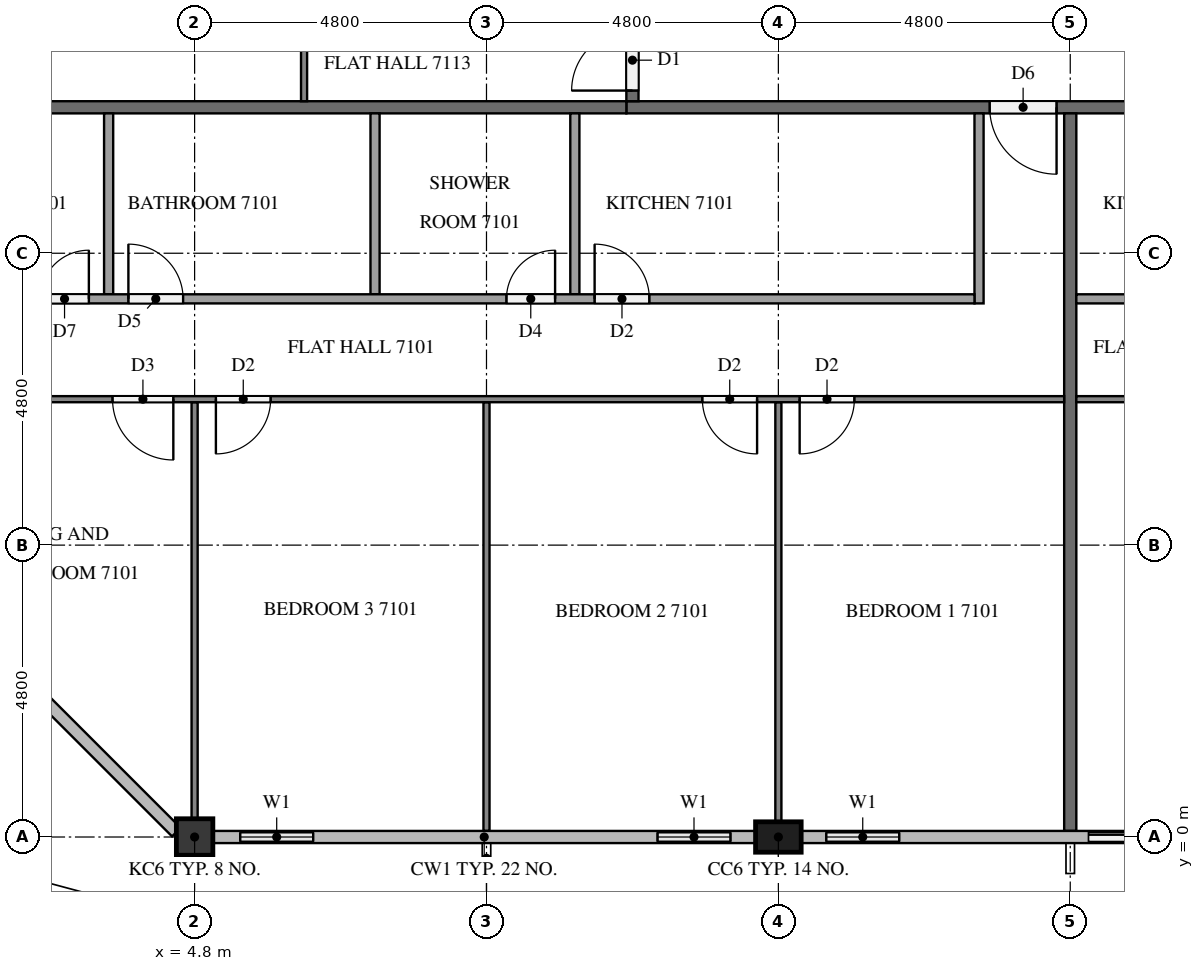
"""IFC4 building model, lengths in metres.
Left out: names, types, materials, properties, quantities, classifications, styles, units other than length and angle.
Written with IfcOpenShell. Run it as: python <this file> out.ifc"""

import sys

from ifc_helpers import new_model, si_unit, direction, frame, frame_2d, origin, origin_2d, place, context, subcontext, project, spatial, rectangle, extrude, element, fill, save


model = new_model("IFC4")
c1 = context("Model", 3, precision=1e-05, world=origin(), true_north=direction((0.0, 1.0)))
c2 = subcontext(c1, "Body", "Model", "MODEL_VIEW")
j1 = project(units=[si_unit("LENGTHUNIT", "METRE"), si_unit("PLANEANGLEUNIT", "RADIAN")], contexts=[c1])
p1 = place(None, origin())
s1 = spatial("IfcSite", under=j1, at=p1, CompositionType="ELEMENT")
p2 = place(p1, origin())
s2 = spatial("IfcBuilding", under=s1, at=p2, CompositionType="ELEMENT")
p3 = place(p2, frame((0.0, 0.0, 272.1)))
s3 = spatial("IfcBuildingStorey", under=s2, at=p3, CompositionType="ELEMENT", Elevation=272.1)
p4 = place(p3, frame((4.8, 0.0, 0.0), z_axis=(0.0, 0.0, 1.0), x_axis=(1.0, 0.0, 0.0)))
e1 = element("IfcColumn", 1, at=p4, inside=s3, PredefinedType="COLUMN", context=c2, shape_type="SweptSolid", body=[
    extrude(rectangle(XDim=0.6, YDim=0.6, at=origin_2d()), origin(), (0.0, 0.0, 1.0), 3.2),
])
p5 = place(p3, frame((14.4, 0.0, 0.0), z_axis=(0.0, 0.0, 1.0), x_axis=(1.0, 0.0, 0.0)))
e2 = element("IfcColumn", 2, at=p5, inside=s3, PredefinedType="COLUMN", context=c2, shape_type="SweptSolid", body=[
    extrude(rectangle(XDim=0.75, YDim=0.5, at=origin_2d()), origin(), (0.0, 0.0, 1.0), 3.2),
])
p6 = place(p3, frame((5.1, 0.0, 0.0), z_axis=(0.0, 0.0, 1.0), x_axis=(1.0, 0.0, 0.0)))
e3 = element("IfcWall", 3, at=p6, inside=s3, PredefinedType="SOLIDWALL", context=c2, shape_type="SweptSolid", body=[
    extrude(rectangle(XDim=2.1, YDim=0.15, at=frame_2d((1.05, 0.0))), origin(), (0.0, 0.0, 1.0), 3.2),
])
p7 = place(p6, frame((0.45, 0.0, 0.9)))
e4 = element("IfcOpeningElement", 4, at=p7, cuts=e3, PredefinedType="OPENING", context=c2, shape_type="SweptSolid", body=[
    extrude(rectangle(XDim=1.2, YDim=1.4, at=frame_2d((0.6, 0.7))), frame((0.0, 0.085, 0.0), z_axis=(0.0, -1.0, 0.0), x_axis=(1.0, 0.0, 0.0)), (0.0, 0.0, 1.0), 0.17),
])
p8 = place(p3, frame((12.0, 0.0, 0.0), z_axis=(0.0, 0.0, 1.0), x_axis=(1.0, 0.0, 0.0)))
e5 = element("IfcWall", 5, at=p8, inside=s3, PredefinedType="SOLIDWALL", context=c2, shape_type="SweptSolid", body=[
    extrude(rectangle(XDim=2.025, YDim=0.15, at=frame_2d((1.012, 0.0))), origin(), (0.0, 0.0, 1.0), 3.2),
])
p9 = place(p8, frame((0.413, 0.0, 0.9)))
e6 = element("IfcOpeningElement", 6, at=p9, cuts=e5, PredefinedType="OPENING", context=c2, shape_type="SweptSolid", body=[
    extrude(rectangle(XDim=1.2, YDim=1.4, at=frame_2d((0.6, 0.7))), frame((0.0, 0.085, 0.0), z_axis=(0.0, -1.0, 0.0), x_axis=(1.0, 0.0, 0.0)), (0.0, 0.0, 1.0), 0.17),
])
p10 = place(p3, frame((14.775, 0.0, 0.0), z_axis=(0.0, 0.0, 1.0), x_axis=(1.0, 0.0, 0.0)))
e7 = element("IfcWall", 7, at=p10, inside=s3, PredefinedType="SOLIDWALL", context=c2, shape_type="SweptSolid", body=[
    extrude(rectangle(XDim=2.025, YDim=0.15, at=frame_2d((1.013, 0.0))), origin(), (0.0, 0.0, 1.0), 3.2),
])
p11 = place(p10, frame((0.413, 0.0, 0.9)))
e8 = element("IfcOpeningElement", 8, at=p11, cuts=e7, PredefinedType="OPENING", context=c2, shape_type="SweptSolid", body=[
    extrude(rectangle(XDim=1.2, YDim=1.4, at=frame_2d((0.6, 0.7))), frame((0.0, 0.085, 0.0), z_axis=(0.0, -1.0, 0.0), x_axis=(1.0, 0.0, 0.0)), (0.0, 0.0, 1.0), 0.17),
])
p12 = place(p3, frame((19.2, 0.0, 0.0), z_axis=(0.0, 0.0, 1.0), x_axis=(1.0, 0.0, 0.0)))
e9 = element("IfcWall", 9, at=p12, inside=s3, PredefinedType="SOLIDWALL", context=c2, shape_type="SweptSolid", body=[
    extrude(rectangle(XDim=2.4, YDim=0.15, at=frame_2d((1.2, 0.0))), origin(), (0.0, 0.0, 1.0), 3.2),
])
p13 = place(p12, frame((0.3, 0.0, 0.0)))
e10 = element("IfcOpeningElement", 10, at=p13, cuts=e9, PredefinedType="OPENING", context=c2, shape_type="SweptSolid", body=[
    extrude(rectangle(XDim=1.8, YDim=2.4, at=frame_2d((0.9, 1.2))), frame((0.0, 0.085, 0.0), z_axis=(0.0, -1.0, 0.0), x_axis=(1.0, 0.0, 0.0)), (0.0, 0.0, 1.0), 0.17),
])
p14 = place(p3, frame((50.5, 12.0, 0.0), z_axis=(0.0, 0.0, 1.0), x_axis=(-1.0, 0.0, 0.0)))
e11 = element("IfcWall", 11, at=p14, inside=s3, PredefinedType="PARTITIONING", context=c2, shape_type="SweptSolid", body=[
    extrude(rectangle(XDim=38.6, YDim=0.2, at=frame_2d((19.3, 0.0))), origin(), (0.0, 0.0, 1.0), 3.2),
])
p15 = place(p14, frame((31.525, 0.0, 0.0)))
e12 = element("IfcOpeningElement", 12, at=p15, cuts=e11, PredefinedType="OPENING", context=c2, shape_type="SweptSolid", body=[
    extrude(rectangle(XDim=1.1, YDim=2.1, at=frame_2d((0.55, 1.05))), frame((0.0, 0.11, 0.0), z_axis=(0.0, -1.0, 0.0), x_axis=(1.0, 0.0, 0.0)), (0.0, 0.0, 1.0), 0.22),
])
p16 = place(p14, frame((19.575, 0.0, 0.0)))
e13 = element("IfcOpeningElement", 13, at=p16, cuts=e11, PredefinedType="OPENING", context=c2, shape_type="SweptSolid", body=[
    extrude(rectangle(XDim=1.0, YDim=2.1, at=frame_2d((0.5, 1.05))), frame((0.0, 0.11, 0.0), z_axis=(0.0, -1.0, 0.0), x_axis=(1.0, 0.0, 0.0)), (0.0, 0.0, 1.0), 0.22),
])
p17 = place(p14, frame((18.025, 0.0, 0.0)))
e14 = element("IfcOpeningElement", 14, at=p17, cuts=e11, PredefinedType="OPENING", context=c2, shape_type="SweptSolid", body=[
    extrude(rectangle(XDim=1.0, YDim=2.1, at=frame_2d((0.5, 1.05))), frame((0.0, 0.11, 0.0), z_axis=(0.0, -1.0, 0.0), x_axis=(1.0, 0.0, 0.0)), (0.0, 0.0, 1.0), 0.22),
])
p18 = place(p14, frame((1.225, 0.0, 0.0)))
e15 = element("IfcOpeningElement", 15, at=p18, cuts=e11, PredefinedType="OPENING", context=c2, shape_type="SweptSolid", body=[
    extrude(rectangle(XDim=1.0, YDim=2.1, at=frame_2d((0.5, 1.05))), frame((0.0, 0.11, 0.0), z_axis=(0.0, -1.0, 0.0), x_axis=(1.0, 0.0, 0.0)), (0.0, 0.0, 1.0), 0.22),
])
p19 = place(p3, frame((12.0, 12.1, 0.0), z_axis=(0.0, 0.0, 1.0), x_axis=(0.0, 1.0, 0.0)))
e16 = element("IfcWall", 16, at=p19, inside=s3, PredefinedType="PARTITIONING", context=c2, shape_type="SweptSolid", body=[
    extrude(rectangle(XDim=28.6, YDim=0.2, at=frame_2d((14.3, 0.0))), origin(), (0.0, 0.0, 1.0), 3.2),
])
p20 = place(p19, frame((24.175, 0.0, 0.0)))
e17 = element("IfcOpeningElement", 17, at=p20, cuts=e16, PredefinedType="OPENING", context=c2, shape_type="SweptSolid", body=[
    extrude(rectangle(XDim=1.0, YDim=2.1, at=frame_2d((0.5, 1.05))), frame((0.0, 0.11, 0.0), z_axis=(0.0, -1.0, 0.0), x_axis=(1.0, 0.0, 0.0)), (0.0, 0.0, 1.0), 0.22),
])
p21 = place(p19, frame((14.575, 0.0, 0.0)))
e18 = element("IfcOpeningElement", 18, at=p21, cuts=e16, PredefinedType="OPENING", context=c2, shape_type="SweptSolid", body=[
    extrude(rectangle(XDim=1.0, YDim=2.1, at=frame_2d((0.5, 1.05))), frame((0.0, 0.11, 0.0), z_axis=(0.0, -1.0, 0.0), x_axis=(1.0, 0.0, 0.0)), (0.0, 0.0, 1.0), 0.22),
])
p22 = place(p19, frame((0.175, 0.0, 0.0)))
e19 = element("IfcOpeningElement", 19, at=p22, cuts=e16, PredefinedType="OPENING", context=c2, shape_type="SweptSolid", body=[
    extrude(rectangle(XDim=1.0, YDim=2.1, at=frame_2d((0.5, 1.05))), frame((0.0, 0.11, 0.0), z_axis=(0.0, -1.0, 0.0), x_axis=(1.0, 0.0, 0.0)), (0.0, 0.0, 1.0), 0.22),
])
for number, where, z_axis, x_axis in (
    (20, (19.2, 11.9, 0.0), (0.0, 0.0, 1.0), (0.0, -1.0, 0.0)),
    (21, (0.1, 12.0, 0.0), (0.0, 0.0, 1.0), (1.0, 0.0, 0.0)),
):
    element("IfcWall", number, at=place(p3, frame(where, z_axis=z_axis, x_axis=x_axis)), inside=s3, PredefinedType="PARTITIONING", context=c2, shape_type="SweptSolid", body=[
        extrude(rectangle(XDim=11.8, YDim=0.2, at=frame_2d((5.9, 0.0))), origin(), (0.0, 0.0, 1.0), 3.2),
    ])
p23 = place(p3, frame((14.4, 7.15, 0.0), z_axis=(0.0, 0.0, 1.0), x_axis=(0.0, -1.0, 0.0)))
e22 = element("IfcWall", 22, at=p23, inside=s3, PredefinedType="PARTITIONING", context=c2, shape_type="SweptSolid", body=[
    extrude(rectangle(XDim=6.9, YDim=0.1, at=frame_2d((3.45, 0.0))), origin(), (0.0, 0.0, 1.0), 3.2),
])
p24 = place(p3, frame((9.6, 7.15, 0.0), z_axis=(0.0, 0.0, 1.0), x_axis=(0.0, -1.0, 0.0)))
e23 = element("IfcWall", 23, at=p24, inside=s3, PredefinedType="PARTITIONING", context=c2, shape_type="SweptSolid", body=[
    extrude(rectangle(XDim=7.05, YDim=0.1, at=frame_2d((3.525, 0.0))), origin(), (0.0, 0.0, 1.0), 3.2),
])
p25 = place(p3, frame((4.8, 7.15, 0.0), z_axis=(0.0, 0.0, 1.0), x_axis=(0.0, -1.0, 0.0)))
e24 = element("IfcWall", 24, at=p25, inside=s3, PredefinedType="PARTITIONING", context=c2, shape_type="SweptSolid", body=[
    extrude(rectangle(XDim=6.85, YDim=0.1, at=frame_2d((3.425, 0.0))), origin(), (0.0, 0.0, 1.0), 3.2),
])
p26 = place(p3, frame((19.1, 7.2, 0.0), z_axis=(0.0, 0.0, 1.0), x_axis=(-1.0, 0.0, 0.0)))
e25 = element("IfcWall", 25, at=p26, inside=s3, PredefinedType="PARTITIONING", context=c2, shape_type="SweptSolid", body=[
    extrude(rectangle(XDim=19.0, YDim=0.1, at=frame_2d((9.5, 0.0))), origin(), (0.0, 0.0, 1.0), 3.2),
])
p27 = place(p26, frame((3.45, 0.0, 0.0)))
e26 = element("IfcOpeningElement", 26, at=p27, cuts=e25, PredefinedType="OPENING", context=c2, shape_type="SweptSolid", body=[
    extrude(rectangle(XDim=0.9, YDim=2.1, at=frame_2d((0.45, 1.05))), frame((0.0, 0.06, 0.0), z_axis=(0.0, -1.0, 0.0), x_axis=(1.0, 0.0, 0.0)), (0.0, 0.0, 1.0), 0.12),
])
p28 = place(p26, frame((5.05, 0.0, 0.0)))
e27 = element("IfcOpeningElement", 27, at=p28, cuts=e25, PredefinedType="OPENING", context=c2, shape_type="SweptSolid", body=[
    extrude(rectangle(XDim=0.9, YDim=2.1, at=frame_2d((0.45, 1.05))), frame((0.0, 0.06, 0.0), z_axis=(0.0, -1.0, 0.0), x_axis=(1.0, 0.0, 0.0)), (0.0, 0.0, 1.0), 0.12),
])
p29 = place(p26, frame((13.05, 0.0, 0.0)))
e28 = element("IfcOpeningElement", 28, at=p29, cuts=e25, PredefinedType="OPENING", context=c2, shape_type="SweptSolid", body=[
    extrude(rectangle(XDim=0.9, YDim=2.1, at=frame_2d((0.45, 1.05))), frame((0.0, 0.06, 0.0), z_axis=(0.0, -1.0, 0.0), x_axis=(1.0, 0.0, 0.0)), (0.0, 0.0, 1.0), 0.12),
])
p30 = place(p26, frame((14.65, 0.0, 0.0)))
e29 = element("IfcOpeningElement", 29, at=p30, cuts=e25, PredefinedType="OPENING", context=c2, shape_type="SweptSolid", body=[
    extrude(rectangle(XDim=1.0, YDim=2.1, at=frame_2d((0.5, 1.05))), frame((0.0, 0.06, 0.0), z_axis=(0.0, -1.0, 0.0), x_axis=(1.0, 0.0, 0.0)), (0.0, 0.0, 1.0), 0.12),
])
for number, where, z_axis, x_axis in (
    (30, (11.053, 11.9, 0.0), (0.0, 0.0, 1.0), (0.0, -1.0, 0.0)),
    (31, (7.767, 11.9, 0.0), (0.0, 0.0, 1.0), (0.0, -1.0, 0.0)),
    (32, (3.386, 11.9, 0.0), (0.0, 0.0, 1.0), (0.0, -1.0, 0.0)),
):
    element("IfcWall", number, at=place(p3, frame(where, z_axis=z_axis, x_axis=x_axis)), inside=s3, PredefinedType="PARTITIONING", context=c2, shape_type="SweptSolid", body=[
        extrude(rectangle(XDim=2.975, YDim=0.15, at=frame_2d((1.487, 0.0))), origin(), (0.0, 0.0, 1.0), 3.2),
    ])
p31 = place(p3, frame((17.7, 11.9, 0.0), z_axis=(0.0, 0.0, 1.0), x_axis=(0.0, -1.0, 0.0)))
e33 = element("IfcWall", 33, at=p31, inside=s3, PredefinedType="PARTITIONING", context=c2, shape_type="SweptSolid", body=[
    extrude(rectangle(XDim=3.125, YDim=0.15, at=frame_2d((1.562, 0.0))), origin(), (0.0, 0.0, 1.0), 3.2),
])
p32 = place(p3, frame((0.1, 8.85, 0.0), z_axis=(0.0, 0.0, 1.0), x_axis=(1.0, 0.0, 0.0)))
e34 = element("IfcWall", 34, at=p32, inside=s3, PredefinedType="PARTITIONING", context=c2, shape_type="SweptSolid", body=[
    extrude(rectangle(XDim=17.525, YDim=0.15, at=frame_2d((8.762, 0.0))), origin(), (0.0, 0.0, 1.0), 3.2),
])
p33 = place(p32, frame((11.278, 0.0, 0.0)))
e35 = element("IfcOpeningElement", 35, at=p33, cuts=e34, PredefinedType="OPENING", context=c2, shape_type="SweptSolid", body=[
    extrude(rectangle(XDim=0.9, YDim=2.1, at=frame_2d((0.45, 1.05))), frame((0.0, 0.085, 0.0), z_axis=(0.0, -1.0, 0.0), x_axis=(1.0, 0.0, 0.0)), (0.0, 0.0, 1.0), 0.17),
])
p34 = place(p32, frame((9.828, 0.0, 0.0)))
e36 = element("IfcOpeningElement", 36, at=p34, cuts=e34, PredefinedType="OPENING", context=c2, shape_type="SweptSolid", body=[
    extrude(rectangle(XDim=0.8, YDim=2.1, at=frame_2d((0.4, 1.05))), frame((0.0, 0.085, 0.0), z_axis=(0.0, -1.0, 0.0), x_axis=(1.0, 0.0, 0.0)), (0.0, 0.0, 1.0), 0.17),
])
p35 = place(p32, frame((3.611, 0.0, 0.0)))
e37 = element("IfcOpeningElement", 37, at=p35, cuts=e34, PredefinedType="OPENING", context=c2, shape_type="SweptSolid", body=[
    extrude(rectangle(XDim=0.9, YDim=2.1, at=frame_2d((0.45, 1.05))), frame((0.0, 0.085, 0.0), z_axis=(0.0, -1.0, 0.0), x_axis=(1.0, 0.0, 0.0)), (0.0, 0.0, 1.0), 0.17),
])
p36 = place(p32, frame((2.161, 0.0, 0.0)))
e38 = element("IfcOpeningElement", 38, at=p36, cuts=e34, PredefinedType="OPENING", context=c2, shape_type="SweptSolid", body=[
    extrude(rectangle(XDim=0.8, YDim=2.1, at=frame_2d((0.4, 1.05))), frame((0.0, 0.085, 0.0), z_axis=(0.0, -1.0, 0.0), x_axis=(1.0, 0.0, 0.0)), (0.0, 0.0, 1.0), 0.17),
])
p37 = place(p3, frame((31.1, 7.2, 0.0), z_axis=(0.0, 0.0, 1.0), x_axis=(-1.0, 0.0, 0.0)))
e39 = element("IfcWall", 39, at=p37, inside=s3, PredefinedType="PARTITIONING", context=c2, shape_type="SweptSolid", body=[
    extrude(rectangle(XDim=11.8, YDim=0.1, at=frame_2d((5.9, 0.0))), origin(), (0.0, 0.0, 1.0), 3.2),
])
p38 = place(p37, frame((3.45, 0.0, 0.0)))
e40 = element("IfcOpeningElement", 40, at=p38, cuts=e39, PredefinedType="OPENING", context=c2, shape_type="SweptSolid", body=[
    extrude(rectangle(XDim=0.9, YDim=2.1, at=frame_2d((0.45, 1.05))), frame((0.0, 0.06, 0.0), z_axis=(0.0, -1.0, 0.0), x_axis=(1.0, 0.0, 0.0)), (0.0, 0.0, 1.0), 0.12),
])
p39 = place(p37, frame((5.05, 0.0, 0.0)))
e41 = element("IfcOpeningElement", 41, at=p39, cuts=e39, PredefinedType="OPENING", context=c2, shape_type="SweptSolid", body=[
    extrude(rectangle(XDim=1.0, YDim=2.1, at=frame_2d((0.5, 1.05))), frame((0.0, 0.06, 0.0), z_axis=(0.0, -1.0, 0.0), x_axis=(1.0, 0.0, 0.0)), (0.0, 0.0, 1.0), 0.12),
])
p40 = place(p3, frame((19.3, 8.85, 0.0), z_axis=(0.0, 0.0, 1.0), x_axis=(1.0, 0.0, 0.0)))
e42 = element("IfcWall", 42, at=p40, inside=s3, PredefinedType="PARTITIONING", context=c2, shape_type="SweptSolid", body=[
    extrude(rectangle(XDim=10.325, YDim=0.15, at=frame_2d((5.163, 0.0))), origin(), (0.0, 0.0, 1.0), 3.2),
])
p41 = place(p40, frame((6.52, 0.0, 0.0)))
e43 = element("IfcOpeningElement", 43, at=p41, cuts=e42, PredefinedType="OPENING", context=c2, shape_type="SweptSolid", body=[
    extrude(rectangle(XDim=0.8, YDim=2.1, at=frame_2d((0.4, 1.05))), frame((0.0, 0.085, 0.0), z_axis=(0.0, -1.0, 0.0), x_axis=(1.0, 0.0, 0.0)), (0.0, 0.0, 1.0), 0.17),
])
p42 = place(p40, frame((4.97, 0.0, 0.0)))
e44 = element("IfcOpeningElement", 44, at=p42, cuts=e42, PredefinedType="OPENING", context=c2, shape_type="SweptSolid", body=[
    extrude(rectangle(XDim=0.9, YDim=2.1, at=frame_2d((0.45, 1.05))), frame((0.0, 0.085, 0.0), z_axis=(0.0, -1.0, 0.0), x_axis=(1.0, 0.0, 0.0)), (0.0, 0.0, 1.0), 0.17),
])
p43 = place(p3, frame((6.6, 12.1, 0.0), z_axis=(0.0, 0.0, 1.0), x_axis=(0.0, 1.0, 0.0)))
e45 = element("IfcWall", 45, at=p43, inside=s3, PredefinedType="PARTITIONING", context=c2, shape_type="SweptSolid", body=[
    extrude(rectangle(XDim=14.2, YDim=0.1, at=frame_2d((7.1, 0.0))), origin(), (0.0, 0.0, 1.0), 3.2),
])
p44 = place(p43, frame((3.35, 0.0, 0.0)))
e46 = element("IfcOpeningElement", 46, at=p44, cuts=e45, PredefinedType="OPENING", context=c2, shape_type="SweptSolid", body=[
    extrude(rectangle(XDim=1.0, YDim=2.1, at=frame_2d((0.5, 1.05))), frame((0.0, 0.06, 0.0), z_axis=(0.0, -1.0, 0.0), x_axis=(1.0, 0.0, 0.0)), (0.0, 0.0, 1.0), 0.12),
])
p45 = place(p43, frame((5.05, 0.0, 0.0)))
e47 = element("IfcOpeningElement", 47, at=p45, cuts=e45, PredefinedType="OPENING", context=c2, shape_type="SweptSolid", body=[
    extrude(rectangle(XDim=0.9, YDim=2.1, at=frame_2d((0.45, 1.05))), frame((0.0, 0.06, 0.0), z_axis=(0.0, -1.0, 0.0), x_axis=(1.0, 0.0, 0.0)), (0.0, 0.0, 1.0), 0.12),
])
p46 = place(p43, frame((13.0, 0.0, 0.0)))
e48 = element("IfcOpeningElement", 48, at=p46, cuts=e45, PredefinedType="OPENING", context=c2, shape_type="SweptSolid", body=[
    extrude(rectangle(XDim=0.9, YDim=2.1, at=frame_2d((0.45, 1.05))), frame((0.0, 0.06, 0.0), z_axis=(0.0, -1.0, 0.0), x_axis=(1.0, 0.0, 0.0)), (0.0, 0.0, 1.0), 0.12),
])
p47 = place(p7, origin())
e49 = element("IfcWindow", 49, at=p47, inside=s3, PartitioningType="SINGLE_PANEL", PredefinedType="WINDOW", context=c2, shape_type="SweptSolid", body=[
    extrude(rectangle(XDim=1.2, YDim=1.4, at=frame_2d((0.6, 0.7))), frame((0.0, 0.03, 0.0), z_axis=(0.0, -1.0, 0.0), x_axis=(1.0, 0.0, 0.0)), (0.0, 0.0, 1.0), 0.06),
])
fill(e4, e49)
p48 = place(p9, origin())
e50 = element("IfcWindow", 50, at=p48, inside=s3, PartitioningType="SINGLE_PANEL", PredefinedType="WINDOW", context=c2, shape_type="SweptSolid", body=[
    extrude(rectangle(XDim=1.2, YDim=1.4, at=frame_2d((0.6, 0.7))), frame((0.0, 0.03, 0.0), z_axis=(0.0, -1.0, 0.0), x_axis=(1.0, 0.0, 0.0)), (0.0, 0.0, 1.0), 0.06),
])
fill(e6, e50)
p49 = place(p11, origin())
e51 = element("IfcWindow", 51, at=p49, inside=s3, PartitioningType="SINGLE_PANEL", PredefinedType="WINDOW", context=c2, shape_type="SweptSolid", body=[
    extrude(rectangle(XDim=1.2, YDim=1.4, at=frame_2d((0.6, 0.7))), frame((0.0, 0.03, 0.0), z_axis=(0.0, -1.0, 0.0), x_axis=(1.0, 0.0, 0.0)), (0.0, 0.0, 1.0), 0.06),
])
fill(e8, e51)
p50 = place(p13, origin())
e52 = element("IfcDoor", 52, at=p50, inside=s3, OperationType="SLIDING_TO_LEFT", PredefinedType="DOOR", context=c2, shape_type="SweptSolid", body=[
    extrude(rectangle(XDim=1.8, YDim=2.4, at=frame_2d((0.9, 1.2))), frame((0.0, 0.025, 0.0), z_axis=(0.0, -1.0, 0.0), x_axis=(1.0, 0.0, 0.0)), (0.0, 0.0, 1.0), 0.05),
])
fill(e10, e52)
p51 = place(p15, origin())
e53 = element("IfcDoor", 53, at=p51, inside=s3, OperationType="SINGLE_SWING_LEFT", PredefinedType="DOOR", context=c2, shape_type="SweptSolid", body=[
    extrude(rectangle(XDim=1.1, YDim=2.1, at=frame_2d((0.55, 1.05))), frame((0.0, 0.025, 0.0), z_axis=(0.0, -1.0, 0.0), x_axis=(1.0, 0.0, 0.0)), (0.0, 0.0, 1.0), 0.05),
])
fill(e12, e53)
p52 = place(p22, origin())
e54 = element("IfcDoor", 54, at=p52, inside=s3, OperationType="SINGLE_SWING_LEFT", PredefinedType="DOOR", context=c2, shape_type="SweptSolid", body=[
    extrude(rectangle(XDim=1.0, YDim=2.1, at=frame_2d((0.5, 1.05))), frame((0.0, 0.025, 0.0), z_axis=(0.0, -1.0, 0.0), x_axis=(1.0, 0.0, 0.0)), (0.0, 0.0, 1.0), 0.05),
])
fill(e19, e54)
p53 = place(p27, origin())
e55 = element("IfcDoor", 55, at=p53, inside=s3, OperationType="SINGLE_SWING_RIGHT", PredefinedType="DOOR", context=c2, shape_type="SweptSolid", body=[
    extrude(rectangle(XDim=0.9, YDim=2.1, at=frame_2d((0.45, 1.05))), frame((0.0, 0.025, 0.0), z_axis=(0.0, -1.0, 0.0), x_axis=(1.0, 0.0, 0.0)), (0.0, 0.0, 1.0), 0.05),
])
fill(e26, e55)
p54 = place(p28, origin())
e56 = element("IfcDoor", 56, at=p54, inside=s3, OperationType="SINGLE_SWING_LEFT", PredefinedType="DOOR", context=c2, shape_type="SweptSolid", body=[
    extrude(rectangle(XDim=0.9, YDim=2.1, at=frame_2d((0.45, 1.05))), frame((0.0, 0.025, 0.0), z_axis=(0.0, -1.0, 0.0), x_axis=(1.0, 0.0, 0.0)), (0.0, 0.0, 1.0), 0.05),
])
fill(e27, e56)
p55 = place(p29, origin())
e57 = element("IfcDoor", 57, at=p55, inside=s3, OperationType="SINGLE_SWING_RIGHT", PredefinedType="DOOR", context=c2, shape_type="SweptSolid", body=[
    extrude(rectangle(XDim=0.9, YDim=2.1, at=frame_2d((0.45, 1.05))), frame((0.0, 0.025, 0.0), z_axis=(0.0, -1.0, 0.0), x_axis=(1.0, 0.0, 0.0)), (0.0, 0.0, 1.0), 0.05),
])
fill(e28, e57)
p56 = place(p30, origin())
e58 = element("IfcDoor", 58, at=p56, inside=s3, OperationType="SINGLE_SWING_LEFT", PredefinedType="DOOR", context=c2, shape_type="SweptSolid", body=[
    extrude(rectangle(XDim=1.0, YDim=2.1, at=frame_2d((0.5, 1.05))), frame((0.0, 0.025, 0.0), z_axis=(0.0, -1.0, 0.0), x_axis=(1.0, 0.0, 0.0)), (0.0, 0.0, 1.0), 0.05),
])
fill(e29, e58)
p57 = place(p33, origin())
e59 = element("IfcDoor", 59, at=p57, inside=s3, OperationType="SINGLE_SWING_LEFT", PredefinedType="DOOR", context=c2, shape_type="SweptSolid", body=[
    extrude(rectangle(XDim=0.9, YDim=2.1, at=frame_2d((0.45, 1.05))), frame((0.0, 0.025, 0.0), z_axis=(0.0, -1.0, 0.0), x_axis=(1.0, 0.0, 0.0)), (0.0, 0.0, 1.0), 0.05),
])
fill(e35, e59)
p58 = place(p34, origin())
e60 = element("IfcDoor", 60, at=p58, inside=s3, OperationType="SINGLE_SWING_RIGHT", PredefinedType="DOOR", context=c2, shape_type="SweptSolid", body=[
    extrude(rectangle(XDim=0.8, YDim=2.1, at=frame_2d((0.4, 1.05))), frame((0.0, 0.025, 0.0), z_axis=(0.0, -1.0, 0.0), x_axis=(1.0, 0.0, 0.0)), (0.0, 0.0, 1.0), 0.05),
])
fill(e36, e60)
p59 = place(p35, origin())
e61 = element("IfcDoor", 61, at=p59, inside=s3, OperationType="SINGLE_SWING_LEFT", PredefinedType="DOOR", context=c2, shape_type="SweptSolid", body=[
    extrude(rectangle(XDim=0.9, YDim=2.1, at=frame_2d((0.45, 1.05))), frame((0.0, 0.025, 0.0), z_axis=(0.0, -1.0, 0.0), x_axis=(1.0, 0.0, 0.0)), (0.0, 0.0, 1.0), 0.05),
])
fill(e37, e61)
p60 = place(p36, origin())
e62 = element("IfcDoor", 62, at=p60, inside=s3, OperationType="SINGLE_SWING_RIGHT", PredefinedType="DOOR", context=c2, shape_type="SweptSolid", body=[
    extrude(rectangle(XDim=0.8, YDim=2.1, at=frame_2d((0.4, 1.05))), frame((0.0, 0.025, 0.0), z_axis=(0.0, -1.0, 0.0), x_axis=(1.0, 0.0, 0.0)), (0.0, 0.0, 1.0), 0.05),
])
fill(e38, e62)
save(model, sys.argv[1])
